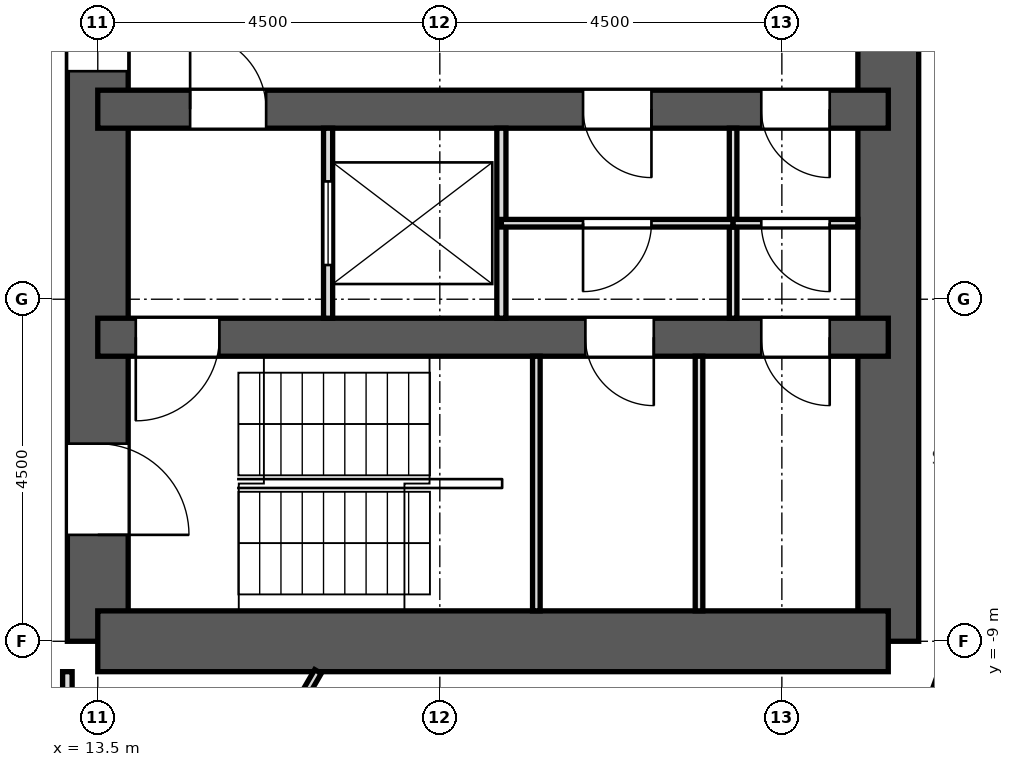
"""IFC4 building model, lengths in metres.
Left out: names, types, materials, properties, quantities, classifications, styles, units other than length and angle.
Written with IfcOpenShell. Run it as: python <this file> out.ifc"""

import sys

from ifc_helpers import new_model, si_unit, direction, frame, frame_2d, origin, place, context, subcontext, project, spatial, rectangle, extrude, element, fill, save


model = new_model("IFC4")
c1 = context("Model", 3, precision=1e-05, world=origin(), true_north=direction((0.0, 1.0)))
c2 = subcontext(c1, "Body", "Model", "MODEL_VIEW")
j1 = project(units=[si_unit("LENGTHUNIT", "METRE"), si_unit("PLANEANGLEUNIT", "RADIAN")], contexts=[c1])
p1 = place(None, origin())
s1 = spatial("IfcSite", under=j1, at=p1, CompositionType="ELEMENT")
p2 = place(p1, origin())
s2 = spatial("IfcBuilding", under=s1, at=p2, CompositionType="ELEMENT")
p3 = place(p2, frame((0.0, 0.0, 101.8)))
s3 = spatial("IfcBuildingStorey", under=s2, at=p3, CompositionType="ELEMENT", Elevation=101.8)
p4 = place(p3, frame((13.5, -9.0, 0.0), z_axis=(0.0, 0.0, 1.0), x_axis=(0.0, 1.0, 0.0)))
e1 = element("IfcWall", 1, at=p4, inside=s3, PredefinedType="SHEAR", context=c2, shape_type="SweptSolid", body=[
    extrude(rectangle(XDim=18.0, YDim=0.8, at=frame_2d((9.0, 0.0))), origin(), (0.0, 0.0, 1.0), 3.3),
])
p5 = place(p4, frame((15.4, 0.0, 0.0)))
e2 = element("IfcOpeningElement", 2, at=p5, cuts=e1, PredefinedType="OPENING", context=c2, shape_type="SweptSolid", body=[
    extrude(rectangle(XDim=1.2, YDim=2.1, at=frame_2d((0.6, 1.05))), frame((0.0, 0.412, 0.0), z_axis=(0.0, -1.0, 0.0), x_axis=(1.0, 0.0, 0.0)), (0.0, 0.0, 1.0), 0.824),
])
p6 = place(p4, frame((1.4, 0.0, 0.0)))
e3 = element("IfcOpeningElement", 3, at=p6, cuts=e1, PredefinedType="OPENING", context=c2, shape_type="SweptSolid", body=[
    extrude(rectangle(XDim=1.2, YDim=2.1, at=frame_2d((0.6, 1.05))), frame((0.0, 0.412, 0.0), z_axis=(0.0, -1.0, 0.0), x_axis=(1.0, 0.0, 0.0)), (0.0, 0.0, 1.0), 0.824),
])
p7 = place(p4, frame((7.5, 0.0, 0.0)))
e4 = element("IfcOpeningElement", 4, at=p7, cuts=e1, PredefinedType="OPENING", context=c2, shape_type="SweptSolid", body=[
    extrude(rectangle(XDim=3.0, YDim=2.4, at=frame_2d((1.5, 1.2))), frame((0.0, 0.412, 0.0), z_axis=(0.0, -1.0, 0.0), x_axis=(1.0, 0.0, 0.0)), (0.0, 0.0, 1.0), 0.824),
])
p8 = place(p3, frame((23.9, -9.0, 0.0), z_axis=(0.0, 0.0, 1.0), x_axis=(0.0, 1.0, 0.0)))
e5 = element("IfcWall", 5, at=p8, inside=s3, PredefinedType="SHEAR", context=c2, shape_type="SweptSolid", body=[
    extrude(rectangle(XDim=18.0, YDim=0.8, at=frame_2d((9.0, 0.0))), origin(), (0.0, 0.0, 1.0), 3.3),
])
p9 = place(p3, frame((13.5, -9.0, 0.0), z_axis=(0.0, 0.0, 1.0), x_axis=(1.0, 0.0, 0.0)))
e6 = element("IfcWall", 6, at=p9, inside=s3, PredefinedType="SHEAR", context=c2, shape_type="SweptSolid", body=[
    extrude(rectangle(XDim=10.4, YDim=0.8, at=frame_2d((5.2, 0.0))), origin(), (0.0, 0.0, 1.0), 3.3),
])
p10 = place(p3, frame((13.5, -5.0, 0.0), z_axis=(0.0, 0.0, 1.0), x_axis=(1.0, 0.0, 0.0)))
e7 = element("IfcWall", 7, at=p10, inside=s3, PredefinedType="SHEAR", context=c2, shape_type="SweptSolid", body=[
    extrude(rectangle(XDim=10.4, YDim=0.5, at=frame_2d((5.2, 0.0))), origin(), (0.0, 0.0, 1.0), 3.3),
])
p11 = place(p10, frame((6.415, 0.0, 0.0)))
e8 = element("IfcOpeningElement", 8, at=p11, cuts=e7, PredefinedType="OPENING", context=c2, shape_type="SweptSolid", body=[
    extrude(rectangle(XDim=0.9, YDim=2.1, at=frame_2d((0.45, 1.05))), frame((0.0, 0.262, 0.0), z_axis=(0.0, -1.0, 0.0), x_axis=(1.0, 0.0, 0.0)), (0.0, 0.0, 1.0), 0.524),
])
p12 = place(p10, frame((8.729, 0.0, 0.0)))
e9 = element("IfcOpeningElement", 9, at=p12, cuts=e7, PredefinedType="OPENING", context=c2, shape_type="SweptSolid", body=[
    extrude(rectangle(XDim=0.9, YDim=2.1, at=frame_2d((0.45, 1.05))), frame((0.0, 0.262, 0.0), z_axis=(0.0, -1.0, 0.0), x_axis=(1.0, 0.0, 0.0)), (0.0, 0.0, 1.0), 0.524),
])
p13 = place(p10, frame((0.5, 0.0, 0.0)))
e10 = element("IfcOpeningElement", 10, at=p13, cuts=e7, PredefinedType="OPENING", context=c2, shape_type="SweptSolid", body=[
    extrude(rectangle(XDim=1.1, YDim=2.1, at=frame_2d((0.55, 1.05))), frame((0.0, 0.262, 0.0), z_axis=(0.0, -1.0, 0.0), x_axis=(1.0, 0.0, 0.0)), (0.0, 0.0, 1.0), 0.524),
])
p14 = place(p3, frame((13.5, -2.0, 0.0), z_axis=(0.0, 0.0, 1.0), x_axis=(1.0, 0.0, 0.0)))
e11 = element("IfcWall", 11, at=p14, inside=s3, PredefinedType="SHEAR", context=c2, shape_type="SweptSolid", body=[
    extrude(rectangle(XDim=10.4, YDim=0.5, at=frame_2d((5.2, 0.0))), origin(), (0.0, 0.0, 1.0), 3.3),
])
p15 = place(p14, frame((1.215, 0.0, 0.0)))
e12 = element("IfcOpeningElement", 12, at=p15, cuts=e11, PredefinedType="OPENING", context=c2, shape_type="SweptSolid", body=[
    extrude(rectangle(XDim=1.0, YDim=2.1, at=frame_2d((0.5, 1.05))), frame((0.0, 0.262, 0.0), z_axis=(0.0, -1.0, 0.0), x_axis=(1.0, 0.0, 0.0)), (0.0, 0.0, 1.0), 0.524),
])
p16 = place(p14, frame((6.384, 0.0, 0.0)))
e13 = element("IfcOpeningElement", 13, at=p16, cuts=e11, PredefinedType="OPENING", context=c2, shape_type="SweptSolid", body=[
    extrude(rectangle(XDim=0.9, YDim=2.1, at=frame_2d((0.45, 1.05))), frame((0.0, 0.262, 0.0), z_axis=(0.0, -1.0, 0.0), x_axis=(1.0, 0.0, 0.0)), (0.0, 0.0, 1.0), 0.524),
])
p17 = place(p14, frame((8.729, 0.0, 0.0)))
e14 = element("IfcOpeningElement", 14, at=p17, cuts=e11, PredefinedType="OPENING", context=c2, shape_type="SweptSolid", body=[
    extrude(rectangle(XDim=0.9, YDim=2.1, at=frame_2d((0.45, 1.05))), frame((0.0, 0.262, 0.0), z_axis=(0.0, -1.0, 0.0), x_axis=(1.0, 0.0, 0.0)), (0.0, 0.0, 1.0), 0.524),
])
p18 = place(p3, frame((24.369, -10.811, 0.0), z_axis=(0.0, 0.0, 1.0), x_axis=(0.341990236633, 0.939703505393, 0.0)))
e15 = element("IfcWall", 15, at=p18, inside=s3, PredefinedType="SOLIDWALL", context=c2, shape_type="SweptSolid", body=[
    extrude(rectangle(XDim=3.648, YDim=0.6, at=frame_2d((1.824, 0.0))), origin(), (0.0, 0.0, 1.0), 2.8),
])
p19 = place(p3, frame((8.092, -8.092, 0.0), z_axis=(0.0, 0.0, 1.0), x_axis=(0.707106781187, -0.707106781187, 0.0)))
e16 = element("IfcWall", 16, at=p19, inside=s3, PredefinedType="PARTITIONING", context=c2, shape_type="SweptSolid", body=[
    extrude(rectangle(XDim=7.083, YDim=0.125, at=frame_2d((3.541, 0.0))), origin(), (0.0, 0.0, 1.0), 2.8),
])
p20 = place(p3, frame((15.565, -10.838, 0.0), z_axis=(0.0, 0.0, 1.0), x_axis=(0.500370548049, 0.865811362044, 0.0)))
e17 = element("IfcWall", 17, at=p20, inside=s3, PredefinedType="PARTITIONING", context=c2, shape_type="SweptSolid", body=[
    extrude(rectangle(XDim=1.663, YDim=0.1, at=frame_2d((0.832, 0.0))), origin(), (0.0, 0.0, 1.0), 2.8),
])
p21 = place(p3, frame((13.1, -13.038, 0.0), z_axis=(0.0, 0.0, 1.0), x_axis=(0.0, 1.0, 0.0)))
e18 = element("IfcWall", 18, at=p21, inside=s3, PredefinedType="PARTITIONING", context=c2, shape_type="SweptSolid", body=[
    extrude(rectangle(XDim=3.638, YDim=0.125, at=frame_2d((1.819, 0.0))), origin(), (0.0, 0.0, 1.0), 2.8),
])
p22 = place(p3, frame((16.53, -4.75, 0.0), z_axis=(0.0, 0.0, 1.0), x_axis=(0.0, 1.0, 0.0)))
e19 = element("IfcWall", 19, at=p22, inside=s3, PredefinedType="PARTITIONING", context=c2, shape_type="SweptSolid", body=[
    extrude(rectangle(XDim=2.5, YDim=0.12, at=frame_2d((1.25, 0.0))), origin(), (0.0, 0.0, 1.0), 2.8),
])
p23 = place(p22, frame((0.7, 0.0, 0.0)))
e20 = element("IfcOpeningElement", 20, at=p23, cuts=e19, PredefinedType="OPENING", context=c2, shape_type="SweptSolid", body=[
    extrude(rectangle(XDim=1.1, YDim=2.1, at=frame_2d((0.55, 1.05))), frame((0.0, 0.072, 0.0), z_axis=(0.0, -1.0, 0.0), x_axis=(1.0, 0.0, 0.0)), (0.0, 0.0, 1.0), 0.144),
])
p24 = place(p3, frame((18.81, -4.75, 0.0), z_axis=(0.0, 0.0, 1.0), x_axis=(0.0, 1.0, 0.0)))
e21 = element("IfcWall", 21, at=p24, inside=s3, PredefinedType="PARTITIONING", context=c2, shape_type="SweptSolid", body=[
    extrude(rectangle(XDim=2.5, YDim=0.12, at=frame_2d((1.25, 0.0))), origin(), (0.0, 0.0, 1.0), 2.8),
])
p25 = place(p3, frame((21.858, -4.75, 0.0), z_axis=(0.0, 0.0, 1.0), x_axis=(0.0, 1.0, 0.0)))
e22 = element("IfcWall", 22, at=p25, inside=s3, PredefinedType="PARTITIONING", context=c2, shape_type="SweptSolid", body=[
    extrude(rectangle(XDim=2.5, YDim=0.1, at=frame_2d((1.25, 0.0))), origin(), (0.0, 0.0, 1.0), 2.8),
])
p26 = place(p3, frame((18.81, -3.5, 0.0), z_axis=(0.0, 0.0, 1.0), x_axis=(1.0, 0.0, 0.0)))
e23 = element("IfcWall", 23, at=p26, inside=s3, PredefinedType="PARTITIONING", context=c2, shape_type="SweptSolid", body=[
    extrude(rectangle(XDim=3.048, YDim=0.1, at=frame_2d((1.524, 0.0))), origin(), (0.0, 0.0, 1.0), 2.8),
])
p27 = place(p26, frame((1.074, 0.0, 0.0)))
e24 = element("IfcOpeningElement", 24, at=p27, cuts=e23, PredefinedType="OPENING", context=c2, shape_type="SweptSolid", body=[
    extrude(rectangle(XDim=0.9, YDim=2.1, at=frame_2d((0.45, 1.05))), frame((0.0, 0.062, 0.0), z_axis=(0.0, -1.0, 0.0), x_axis=(1.0, 0.0, 0.0)), (0.0, 0.0, 1.0), 0.124),
])
p28 = place(p3, frame((21.858, -3.5, 0.0), z_axis=(0.0, 0.0, 1.0), x_axis=(1.0, 0.0, 0.0)))
e25 = element("IfcWall", 25, at=p28, inside=s3, PredefinedType="PARTITIONING", context=c2, shape_type="SweptSolid", body=[
    extrude(rectangle(XDim=1.642, YDim=0.1, at=frame_2d((0.821, 0.0))), origin(), (0.0, 0.0, 1.0), 2.8),
])
p29 = place(p28, frame((0.371, 0.0, 0.0)))
e26 = element("IfcOpeningElement", 26, at=p29, cuts=e25, PredefinedType="OPENING", context=c2, shape_type="SweptSolid", body=[
    extrude(rectangle(XDim=0.9, YDim=2.1, at=frame_2d((0.45, 1.05))), frame((0.0, 0.062, 0.0), z_axis=(0.0, -1.0, 0.0), x_axis=(1.0, 0.0, 0.0)), (0.0, 0.0, 1.0), 0.124),
])
for number, where, z_axis, x_axis in (
    (27, (19.27, -8.6, 0.0), (0.0, 0.0, 1.0), (0.0, 1.0, 0.0)),
    (28, (21.41, -8.6, 0.0), (0.0, 0.0, 1.0), (0.0, 1.0, 0.0)),
):
    element("IfcWall", number, at=place(p3, frame(where, z_axis=z_axis, x_axis=x_axis)), inside=s3, PredefinedType="PARTITIONING", context=c2, shape_type="SweptSolid", body=[
        extrude(rectangle(XDim=3.35, YDim=0.1, at=frame_2d((1.675, 0.0))), origin(), (0.0, 0.0, 1.0), 2.8),
    ])
p30 = place(p23, origin())
e29 = element("IfcDoor", 29, at=p30, inside=s3, OperationType="DOUBLE_DOOR_SLIDING", PredefinedType="DOOR", context=c2, shape_type="SweptSolid", body=[
    extrude(rectangle(XDim=1.1, YDim=2.1, at=frame_2d((0.55, 1.05))), frame((0.0, 0.025, 0.0), z_axis=(0.0, -1.0, 0.0), x_axis=(1.0, 0.0, 0.0)), (0.0, 0.0, 1.0), 0.05),
])
fill(e20, e29)
p31 = place(p15, origin())
e30 = element("IfcDoor", 30, at=p31, inside=s3, OperationType="SINGLE_SWING_LEFT", PredefinedType="DOOR", context=c2, shape_type="SweptSolid", body=[
    extrude(rectangle(XDim=1.0, YDim=2.1, at=frame_2d((0.5, 1.05))), frame((0.0, 0.025, 0.0), z_axis=(0.0, -1.0, 0.0), x_axis=(1.0, 0.0, 0.0)), (0.0, 0.0, 1.0), 0.05),
])
fill(e12, e30)
p32 = place(p16, frame((0.9, 0.0, 0.0), z_axis=(0.0, 0.0, 1.0), x_axis=(-1.0, 0.0, 0.0)))
e31 = element("IfcDoor", 31, at=p32, inside=s3, OperationType="SINGLE_SWING_LEFT", PredefinedType="DOOR", context=c2, shape_type="SweptSolid", body=[
    extrude(rectangle(XDim=0.9, YDim=2.1, at=frame_2d((0.45, 1.05))), frame((0.0, 0.025, 0.0), z_axis=(0.0, -1.0, 0.0), x_axis=(1.0, 0.0, 0.0)), (0.0, 0.0, 1.0), 0.05),
])
fill(e13, e31)
p33 = place(p17, frame((0.9, 0.0, 0.0), z_axis=(0.0, 0.0, 1.0), x_axis=(-1.0, 0.0, 0.0)))
e32 = element("IfcDoor", 32, at=p33, inside=s3, OperationType="SINGLE_SWING_LEFT", PredefinedType="DOOR", context=c2, shape_type="SweptSolid", body=[
    extrude(rectangle(XDim=0.9, YDim=2.1, at=frame_2d((0.45, 1.05))), frame((0.0, 0.025, 0.0), z_axis=(0.0, -1.0, 0.0), x_axis=(1.0, 0.0, 0.0)), (0.0, 0.0, 1.0), 0.05),
])
fill(e14, e32)
p34 = place(p29, frame((0.9, 0.0, 0.0), z_axis=(0.0, 0.0, 1.0), x_axis=(-1.0, 0.0, 0.0)))
e33 = element("IfcDoor", 33, at=p34, inside=s3, OperationType="SINGLE_SWING_LEFT", PredefinedType="DOOR", context=c2, shape_type="SweptSolid", body=[
    extrude(rectangle(XDim=0.9, YDim=2.1, at=frame_2d((0.45, 1.05))), frame((0.0, 0.025, 0.0), z_axis=(0.0, -1.0, 0.0), x_axis=(1.0, 0.0, 0.0)), (0.0, 0.0, 1.0), 0.05),
])
fill(e26, e33)
p35 = place(p27, frame((0.9, 0.0, 0.0), z_axis=(0.0, 0.0, 1.0), x_axis=(-1.0, 0.0, 0.0)))
e34 = element("IfcDoor", 34, at=p35, inside=s3, OperationType="SINGLE_SWING_RIGHT", PredefinedType="DOOR", context=c2, shape_type="SweptSolid", body=[
    extrude(rectangle(XDim=0.9, YDim=2.1, at=frame_2d((0.45, 1.05))), frame((0.0, 0.025, 0.0), z_axis=(0.0, -1.0, 0.0), x_axis=(1.0, 0.0, 0.0)), (0.0, 0.0, 1.0), 0.05),
])
fill(e24, e34)
p36 = place(p11, frame((0.9, 0.0, 0.0), z_axis=(0.0, 0.0, 1.0), x_axis=(-1.0, 0.0, 0.0)))
e35 = element("IfcDoor", 35, at=p36, inside=s3, OperationType="SINGLE_SWING_LEFT", PredefinedType="DOOR", context=c2, shape_type="SweptSolid", body=[
    extrude(rectangle(XDim=0.9, YDim=2.1, at=frame_2d((0.45, 1.05))), frame((0.0, 0.025, 0.0), z_axis=(0.0, -1.0, 0.0), x_axis=(1.0, 0.0, 0.0)), (0.0, 0.0, 1.0), 0.05),
])
fill(e8, e35)
p37 = place(p12, frame((0.9, 0.0, 0.0), z_axis=(0.0, 0.0, 1.0), x_axis=(-1.0, 0.0, 0.0)))
e36 = element("IfcDoor", 36, at=p37, inside=s3, OperationType="SINGLE_SWING_LEFT", PredefinedType="DOOR", context=c2, shape_type="SweptSolid", body=[
    extrude(rectangle(XDim=0.9, YDim=2.1, at=frame_2d((0.45, 1.05))), frame((0.0, 0.025, 0.0), z_axis=(0.0, -1.0, 0.0), x_axis=(1.0, 0.0, 0.0)), (0.0, 0.0, 1.0), 0.05),
])
fill(e9, e36)
p38 = place(p13, frame((1.1, 0.0, 0.0), z_axis=(0.0, 0.0, 1.0), x_axis=(-1.0, 0.0, 0.0)))
e37 = element("IfcDoor", 37, at=p38, inside=s3, OperationType="SINGLE_SWING_RIGHT", PredefinedType="DOOR", context=c2, shape_type="SweptSolid", body=[
    extrude(rectangle(XDim=1.1, YDim=2.1, at=frame_2d((0.55, 1.05))), frame((0.0, 0.025, 0.0), z_axis=(0.0, -1.0, 0.0), x_axis=(1.0, 0.0, 0.0)), (0.0, 0.0, 1.0), 0.05),
])
fill(e10, e37)
p39 = place(p6, frame((1.2, 0.0, 0.0), z_axis=(0.0, 0.0, 1.0), x_axis=(-1.0, 0.0, 0.0)))
e38 = element("IfcDoor", 38, at=p39, inside=s3, OperationType="SINGLE_SWING_RIGHT", PredefinedType="DOOR", context=c2, shape_type="SweptSolid", body=[
    extrude(rectangle(XDim=1.2, YDim=2.1, at=frame_2d((0.6, 1.05))), frame((0.0, 0.025, 0.0), z_axis=(0.0, -1.0, 0.0), x_axis=(1.0, 0.0, 0.0)), (0.0, 0.0, 1.0), 0.05),
])
fill(e3, e38)
p40 = place(p7, origin())
e39 = element("IfcDoor", 39, at=p40, inside=s3, OperationType="DOUBLE_DOOR_SLIDING", PredefinedType="DOOR", context=c2, shape_type="SweptSolid", body=[
    extrude(rectangle(XDim=3.0, YDim=2.4, at=frame_2d((1.5, 1.2))), frame((0.0, 0.025, 0.0), z_axis=(0.0, -1.0, 0.0), x_axis=(1.0, 0.0, 0.0)), (0.0, 0.0, 1.0), 0.05),
])
fill(e4, e39)
save(model, sys.argv[1])
